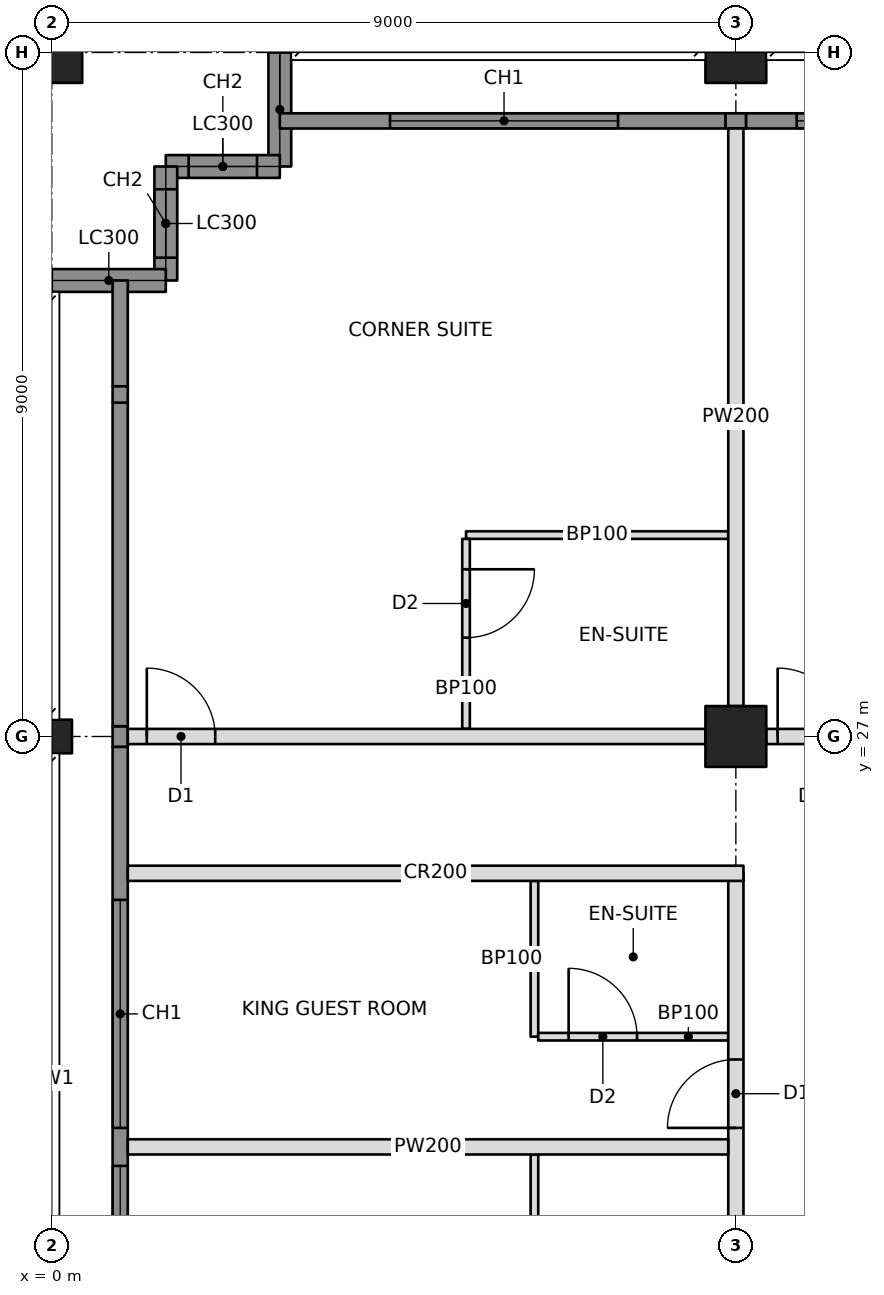
"""IFC4 building model, lengths in metres.
Left out: names, types, materials, properties, quantities, classifications, styles, units other than length and angle.
Written with IfcOpenShell. Run it as: python <this file> out.ifc"""

import sys

from ifc_helpers import new_model, si_unit, direction, frame, frame_2d, origin, origin_2d, place, context, subcontext, project, spatial, rectangle, hollow_rectangle, i_section, extrude, element, fill, save


model = new_model("IFC4")
c1 = context("Model", 3, precision=1e-05, world=origin(), true_north=direction((0.0, 1.0)))
c2 = subcontext(c1, "Body", "Model", "MODEL_VIEW")
j1 = project(units=[si_unit("LENGTHUNIT", "METRE"), si_unit("PLANEANGLEUNIT", "RADIAN")], contexts=[c1])
p1 = place(None, origin())
s1 = spatial("IfcSite", under=j1, at=p1, CompositionType="ELEMENT")
p2 = place(p1, origin())
s2 = spatial("IfcBuilding", under=s1, at=p2, CompositionType="ELEMENT")
p3 = place(p2, frame((0.0, 0.0, 148.6)))
s3 = spatial("IfcBuildingStorey", under=s2, at=p3, CompositionType="ELEMENT", Elevation=148.6)
p4 = place(p3, frame((0.0, 27.0, 0.0), z_axis=(0.0, 0.0, 1.0), x_axis=(0.0, 1.0, 0.0)))
e1 = element("IfcColumn", 1, at=p4, inside=s3, PredefinedType="COLUMN", context=c2, shape_type="SweptSolid", body=[
    extrude(i_section(OverallWidth=0.442, OverallDepth=0.531, WebThickness=0.066, FlangeThickness=0.106, at=origin_2d()), origin(), (0.0, 0.0, 1.0), 3.4),
])
p5 = place(p3, frame((0.0, 36.0, 0.0), z_axis=(0.0, 0.0, 1.0), x_axis=(1.0, 0.0, 0.0)))
e2 = element("IfcColumn", 2, at=p5, inside=s3, PredefinedType="COLUMN", context=c2, shape_type="SweptSolid", body=[
    extrude(hollow_rectangle(XDim=0.8, YDim=0.8, WallThickness=0.06, at=origin_2d()), origin(), (0.0, 0.0, 1.0), 3.4),
])
p6 = place(p3, frame((9.0, 27.0, 0.0), z_axis=(0.0, 0.0, 1.0), x_axis=(1.0, 0.0, 0.0)))
e3 = element("IfcColumn", 3, at=p6, inside=s3, PredefinedType="COLUMN", context=c2, shape_type="SweptSolid", body=[
    extrude(hollow_rectangle(XDim=0.8, YDim=0.8, WallThickness=0.07, at=origin_2d()), origin(), (0.0, 0.0, 1.0), 3.4),
])
p7 = place(p3, frame((9.0, 36.0, 0.0), z_axis=(0.0, 0.0, 1.0), x_axis=(1.0, 0.0, 0.0)))
e4 = element("IfcColumn", 4, at=p7, inside=s3, PredefinedType="COLUMN", context=c2, shape_type="SweptSolid", body=[
    extrude(hollow_rectangle(XDim=0.8, YDim=0.8, WallThickness=0.06, at=origin_2d()), origin(), (0.0, 0.0, 1.0), 3.4),
])
p8 = place(p3, frame((3.0, 36.0, 0.0), z_axis=(0.0, 0.0, 1.0), x_axis=(0.0, -1.0, 0.0)))
e5 = element("IfcWall", 5, at=p8, inside=s3, PredefinedType="SOLIDWALL", context=c2, shape_type="SweptSolid", body=[
    extrude(rectangle(XDim=1.5, YDim=0.3, at=frame_2d((0.75, 0.0))), origin(), (0.0, 0.0, 1.0), 2.42),
])
p9 = place(p3, frame((3.0, 34.5, 0.0), z_axis=(0.0, 0.0, 1.0), x_axis=(-1.0, 0.0, 0.0)))
e6 = element("IfcWall", 6, at=p9, inside=s3, PredefinedType="SOLIDWALL", context=c2, shape_type="SweptSolid", body=[
    extrude(rectangle(XDim=1.5, YDim=0.3, at=frame_2d((0.75, 0.0))), origin(), (0.0, 0.0, 1.0), 3.2),
])
p10 = place(p9, frame((0.3, 0.0, 0.6)))
e7 = element("IfcOpeningElement", 7, at=p10, cuts=e6, PredefinedType="OPENING", context=c2, shape_type="SweptSolid", body=[
    extrude(rectangle(XDim=0.9, YDim=2.2, at=frame_2d((0.45, 1.1))), frame((0.0, 0.16, 0.0), z_axis=(0.0, -1.0, 0.0), x_axis=(1.0, 0.0, 0.0)), (0.0, 0.0, 1.0), 0.32),
])
p11 = place(p3, frame((1.5, 34.5, 0.0), z_axis=(0.0, 0.0, 1.0), x_axis=(0.0, -1.0, 0.0)))
e8 = element("IfcWall", 8, at=p11, inside=s3, PredefinedType="SOLIDWALL", context=c2, shape_type="SweptSolid", body=[
    extrude(rectangle(XDim=1.5, YDim=0.3, at=frame_2d((0.75, 0.0))), origin(), (0.0, 0.0, 1.0), 3.2),
])
p12 = place(p11, frame((0.3, 0.0, 0.6)))
e9 = element("IfcOpeningElement", 9, at=p12, cuts=e8, PredefinedType="OPENING", context=c2, shape_type="SweptSolid", body=[
    extrude(rectangle(XDim=0.9, YDim=2.2, at=frame_2d((0.45, 1.1))), frame((0.0, 0.16, 0.0), z_axis=(0.0, -1.0, 0.0), x_axis=(1.0, 0.0, 0.0)), (0.0, 0.0, 1.0), 0.32),
])
p13 = place(p3, frame((1.5, 33.0, 0.0), z_axis=(0.0, 0.0, 1.0), x_axis=(-1.0, 0.0, 0.0)))
e10 = element("IfcWall", 10, at=p13, inside=s3, PredefinedType="SOLIDWALL", context=c2, shape_type="SweptSolid", body=[
    extrude(rectangle(XDim=1.5, YDim=0.3, at=frame_2d((0.75, 0.0))), origin(), (0.0, 0.0, 1.0), 2.42),
])
p14 = place(p3, frame((3.0, 35.1, 0.0), z_axis=(0.0, 0.0, 1.0), x_axis=(1.0, 0.0, 0.0)))
e11 = element("IfcWall", 11, at=p14, inside=s3, PredefinedType="SOLIDWALL", context=c2, shape_type="SweptSolid", body=[
    extrude(rectangle(XDim=5.865, YDim=0.2, at=frame_2d((2.932, 0.0))), origin(), (0.0, 0.0, 1.0), 3.2),
])
p15 = place(p14, frame((1.45, 0.0, 0.6)))
e12 = element("IfcOpeningElement", 12, at=p15, cuts=e11, PredefinedType="OPENING", context=c2, shape_type="SweptSolid", body=[
    extrude(rectangle(XDim=3.0, YDim=2.2, at=frame_2d((1.5, 1.1))), frame((0.0, 0.11, 0.0), z_axis=(0.0, -1.0, 0.0), x_axis=(1.0, 0.0, 0.0)), (0.0, 0.0, 1.0), 0.22),
])
p16 = place(p3, frame((1.0, 27.0, 0.0), z_axis=(0.0, 0.0, 1.0), x_axis=(1.0, 0.0, 0.0)))
e13 = element("IfcWall", 13, at=p16, inside=s3, PredefinedType="PARTITIONING", context=c2, shape_type="SweptSolid", body=[
    extrude(rectangle(XDim=7.6, YDim=0.2, at=frame_2d((3.8, 0.0))), origin(), (0.0, 0.0, 1.0), 2.438),
])
p17 = place(p16, frame((0.25, 0.0, 0.0)))
e14 = element("IfcOpeningElement", 14, at=p17, cuts=e13, PredefinedType="OPENING", context=c2, shape_type="SweptSolid", body=[
    extrude(rectangle(XDim=0.9, YDim=2.1, at=frame_2d((0.45, 1.05))), frame((0.0, 0.11, 0.0), z_axis=(0.0, -1.0, 0.0), x_axis=(1.0, 0.0, 0.0)), (0.0, 0.0, 1.0), 0.22),
])
p18 = place(p3, frame((9.4, 27.0, 0.0), z_axis=(0.0, 0.0, 1.0), x_axis=(1.0, 0.0, 0.0)))
e15 = element("IfcWall", 15, at=p18, inside=s3, PredefinedType="PARTITIONING", context=c2, shape_type="SweptSolid", body=[
    extrude(rectangle(XDim=8.2, YDim=0.2, at=frame_2d((4.1, 0.0))), origin(), (0.0, 0.0, 1.0), 2.405),
])
p19 = place(p18, frame((0.15, 0.0, 0.0)))
e16 = element("IfcOpeningElement", 16, at=p19, cuts=e15, PredefinedType="OPENING", context=c2, shape_type="SweptSolid", body=[
    extrude(rectangle(XDim=0.9, YDim=2.1, at=frame_2d((0.45, 1.05))), frame((0.0, 0.11, 0.0), z_axis=(0.0, -1.0, 0.0), x_axis=(1.0, 0.0, 0.0)), (0.0, 0.0, 1.0), 0.22),
])
p20 = place(p3, frame((9.0, 18.4, 0.0), z_axis=(0.0, 0.0, 1.0), x_axis=(0.0, 1.0, 0.0)))
e17 = element("IfcWall", 17, at=p20, inside=s3, PredefinedType="PARTITIONING", context=c2, shape_type="SweptSolid", body=[
    extrude(rectangle(XDim=6.8, YDim=0.2, at=frame_2d((3.4, 0.0))), origin(), (0.0, 0.0, 1.0), 2.405),
])
p21 = place(p20, frame((3.45, 0.0, 0.0)))
e18 = element("IfcOpeningElement", 18, at=p21, cuts=e17, PredefinedType="OPENING", context=c2, shape_type="SweptSolid", body=[
    extrude(rectangle(XDim=0.9, YDim=2.1, at=frame_2d((0.45, 1.05))), frame((0.0, 0.11, 0.0), z_axis=(0.0, -1.0, 0.0), x_axis=(1.0, 0.0, 0.0)), (0.0, 0.0, 1.0), 0.22),
])
p22 = place(p3, frame((1.0, 25.2, 0.0), z_axis=(0.0, 0.0, 1.0), x_axis=(1.0, 0.0, 0.0)))
e19 = element("IfcWall", 19, at=p22, inside=s3, PredefinedType="PARTITIONING", context=c2, shape_type="SweptSolid", body=[
    extrude(rectangle(XDim=8.1, YDim=0.2, at=frame_2d((4.05, 0.0))), origin(), (0.0, 0.0, 1.0), 2.404),
])
p23 = place(p3, frame((9.0, 27.4, 0.0), z_axis=(0.0, 0.0, 1.0), x_axis=(0.0, 1.0, 0.0)))
e20 = element("IfcWall", 20, at=p23, inside=s3, PredefinedType="PARTITIONING", context=c2, shape_type="SweptSolid", body=[
    extrude(rectangle(XDim=7.6, YDim=0.2, at=frame_2d((3.8, 0.0))), origin(), (0.0, 0.0, 1.0), 2.438),
])
p24 = place(p3, frame((5.45, 29.65, 0.0), z_axis=(0.0, 0.0, 1.0), x_axis=(1.0, 0.0, 0.0)))
e21 = element("IfcWall", 21, at=p24, inside=s3, PredefinedType="PARTITIONING", context=c2, shape_type="SweptSolid", body=[
    extrude(rectangle(XDim=3.45, YDim=0.1, at=frame_2d((1.725, 0.0))), origin(), (0.0, 0.0, 1.0), 2.438),
])
p25 = place(p3, frame((5.45, 27.1, 0.0), z_axis=(0.0, 0.0, 1.0), x_axis=(0.0, 1.0, 0.0)))
e22 = element("IfcWall", 22, at=p25, inside=s3, PredefinedType="PARTITIONING", context=c2, shape_type="SweptSolid", body=[
    extrude(rectangle(XDim=2.5, YDim=0.1, at=frame_2d((1.25, 0.0))), origin(), (0.0, 0.0, 1.0), 2.438),
])
p26 = place(p25, frame((1.2, 0.0, 0.0)))
e23 = element("IfcOpeningElement", 23, at=p26, cuts=e22, PredefinedType="OPENING", context=c2, shape_type="SweptSolid", body=[
    extrude(rectangle(XDim=0.9, YDim=2.1, at=frame_2d((0.45, 1.05))), frame((0.0, 0.06, 0.0), z_axis=(0.0, -1.0, 0.0), x_axis=(1.0, 0.0, 0.0)), (0.0, 0.0, 1.0), 0.12),
])
p27 = place(p3, frame((8.9, 21.6, 0.0), z_axis=(0.0, 0.0, 1.0), x_axis=(-1.0, 0.0, 0.0)))
e24 = element("IfcWall", 24, at=p27, inside=s3, PredefinedType="PARTITIONING", context=c2, shape_type="SweptSolid", body=[
    extrude(rectangle(XDim=7.9, YDim=0.2, at=frame_2d((3.95, 0.0))), origin(), (0.0, 0.0, 1.0), 2.404),
])
p28 = place(p3, frame((6.35, 18.05, 0.0), z_axis=(0.0, 0.0, 1.0), x_axis=(0.0, 1.0, 0.0)))
e25 = element("IfcWall", 25, at=p28, inside=s3, PredefinedType="PARTITIONING", context=c2, shape_type="SweptSolid", body=[
    extrude(rectangle(XDim=3.45, YDim=0.1, at=frame_2d((1.725, 0.0))), origin(), (0.0, 0.0, 1.0), 2.404),
])
p29 = place(p3, frame((6.35, 23.05, 0.0), z_axis=(0.0, 0.0, 1.0), x_axis=(0.0, 1.0, 0.0)))
e26 = element("IfcWall", 26, at=p29, inside=s3, PredefinedType="PARTITIONING", context=c2, shape_type="SweptSolid", body=[
    extrude(rectangle(XDim=2.05, YDim=0.1, at=frame_2d((1.025, 0.0))), origin(), (0.0, 0.0, 1.0), 3.2),
])
p30 = place(p3, frame((8.9, 23.05, 0.0), z_axis=(0.0, 0.0, 1.0), x_axis=(-1.0, 0.0, 0.0)))
e27 = element("IfcWall", 27, at=p30, inside=s3, PredefinedType="PARTITIONING", context=c2, shape_type="SweptSolid", body=[
    extrude(rectangle(XDim=2.5, YDim=0.1, at=frame_2d((1.25, 0.0))), origin(), (0.0, 0.0, 1.0), 2.404),
])
p31 = place(p30, frame((1.2, 0.0, 0.0)))
e28 = element("IfcOpeningElement", 28, at=p31, cuts=e27, PredefinedType="OPENING", context=c2, shape_type="SweptSolid", body=[
    extrude(rectangle(XDim=0.9, YDim=2.1, at=frame_2d((0.45, 1.05))), frame((0.0, 0.06, 0.0), z_axis=(0.0, -1.0, 0.0), x_axis=(1.0, 0.0, 0.0)), (0.0, 0.0, 1.0), 0.12),
])
p32 = place(p3, frame((0.9, 18.194, 0.0), z_axis=(0.0, 0.0, 1.0), x_axis=(0.0, 1.0, 0.0)))
e29 = element("IfcWall", 29, at=p32, inside=s3, PredefinedType="SOLIDWALL", context=c2, shape_type="SweptSolid", body=[
    extrude(rectangle(XDim=8.671, YDim=0.2, at=frame_2d((4.335, 0.0))), origin(), (0.0, 0.0, 1.0), 3.2),
])
p33 = place(p32, frame((0.156, 0.0, 0.6)))
e30 = element("IfcOpeningElement", 30, at=p33, cuts=e29, PredefinedType="OPENING", context=c2, shape_type="SweptSolid", body=[
    extrude(rectangle(XDim=3.0, YDim=2.2, at=frame_2d((1.5, 1.1))), frame((0.0, 0.11, 0.0), z_axis=(0.0, -1.0, 0.0), x_axis=(1.0, 0.0, 0.0)), (0.0, 0.0, 1.0), 0.22),
])
p34 = place(p32, frame((3.656, 0.0, 0.6)))
e31 = element("IfcOpeningElement", 31, at=p34, cuts=e29, PredefinedType="OPENING", context=c2, shape_type="SweptSolid", body=[
    extrude(rectangle(XDim=3.0, YDim=2.2, at=frame_2d((1.5, 1.1))), frame((0.0, 0.11, 0.0), z_axis=(0.0, -1.0, 0.0), x_axis=(1.0, 0.0, 0.0)), (0.0, 0.0, 1.0), 0.22),
])
p35 = place(p3, frame((0.9, 26.865, 0.0), z_axis=(0.0, 0.0, 1.0), x_axis=(0.0, 1.0, 0.0)))
e32 = element("IfcWall", 32, at=p35, inside=s3, PredefinedType="SOLIDWALL", context=c2, shape_type="SweptSolid", body=[
    extrude(rectangle(XDim=0.271, YDim=0.2, at=frame_2d((0.135, 0.0))), origin(), (0.0, 0.0, 1.0), 2.438),
])
p36 = place(p3, frame((0.9, 27.135, 0.0), z_axis=(0.0, 0.0, 1.0), x_axis=(0.0, 1.0, 0.0)))
e33 = element("IfcWall", 33, at=p36, inside=s3, PredefinedType="SOLIDWALL", context=c2, shape_type="SweptSolid", body=[
    extrude(rectangle(XDim=4.257, YDim=0.2, at=frame_2d((2.129, 0.0))), origin(), (0.0, 0.0, 1.0), 3.2),
])
p37 = place(p3, frame((0.9, 31.393, 0.0), z_axis=(0.0, 0.0, 1.0), x_axis=(0.0, 1.0, 0.0)))
e34 = element("IfcWall", 34, at=p37, inside=s3, PredefinedType="SOLIDWALL", context=c2, shape_type="SweptSolid", body=[
    extrude(rectangle(XDim=0.215, YDim=0.2, at=frame_2d((0.107, 0.0))), origin(), (0.0, 0.0, 1.0), 2.661),
])
p38 = place(p3, frame((0.9, 31.607, 0.0), z_axis=(0.0, 0.0, 1.0), x_axis=(0.0, 1.0, 0.0)))
e35 = element("IfcWall", 35, at=p38, inside=s3, PredefinedType="SOLIDWALL", context=c2, shape_type="SweptSolid", body=[
    extrude(rectangle(XDim=1.393, YDim=0.2, at=frame_2d((0.696, 0.0))), origin(), (0.0, 0.0, 1.0), 3.2),
])
p39 = place(p3, frame((8.865, 35.1, 0.0), z_axis=(0.0, 0.0, 1.0), x_axis=(1.0, 0.0, 0.0)))
e36 = element("IfcWall", 36, at=p39, inside=s3, PredefinedType="SOLIDWALL", context=c2, shape_type="SweptSolid", body=[
    extrude(rectangle(XDim=0.271, YDim=0.2, at=frame_2d((0.135, 0.0))), origin(), (0.0, 0.0, 1.0), 2.438),
])
p40 = place(p3, frame((9.135, 35.1, 0.0), z_axis=(0.0, 0.0, 1.0), x_axis=(1.0, 0.0, 0.0)))
e37 = element("IfcWall", 37, at=p40, inside=s3, PredefinedType="SOLIDWALL", context=c2, shape_type="SweptSolid", body=[
    extrude(rectangle(XDim=8.671, YDim=0.2, at=frame_2d((4.335, 0.0))), origin(), (0.0, 0.0, 1.0), 3.2),
])
p41 = place(p40, frame((0.665, 0.0, 0.6)))
e38 = element("IfcOpeningElement", 38, at=p41, cuts=e37, PredefinedType="OPENING", context=c2, shape_type="SweptSolid", body=[
    extrude(rectangle(XDim=3.0, YDim=2.2, at=frame_2d((1.5, 1.1))), frame((0.0, 0.11, 0.0), z_axis=(0.0, -1.0, 0.0), x_axis=(1.0, 0.0, 0.0)), (0.0, 0.0, 1.0), 0.22),
])
p42 = place(p40, frame((5.065, 0.0, 0.6)))
e39 = element("IfcOpeningElement", 39, at=p42, cuts=e37, PredefinedType="OPENING", context=c2, shape_type="SweptSolid", body=[
    extrude(rectangle(XDim=3.0, YDim=2.2, at=frame_2d((1.5, 1.1))), frame((0.0, 0.11, 0.0), z_axis=(0.0, -1.0, 0.0), x_axis=(1.0, 0.0, 0.0)), (0.0, 0.0, 1.0), 0.22),
])
p43 = place(p10, origin())
e40 = element("IfcWindow", 40, at=p43, inside=s3, PartitioningType="SINGLE_PANEL", PredefinedType="WINDOW", context=c2, shape_type="SweptSolid", body=[
    extrude(rectangle(XDim=0.9, YDim=2.2, at=frame_2d((0.45, 1.1))), frame((0.0, 0.03, 0.0), z_axis=(0.0, -1.0, 0.0), x_axis=(1.0, 0.0, 0.0)), (0.0, 0.0, 1.0), 0.06),
])
fill(e7, e40)
p44 = place(p12, origin())
e41 = element("IfcWindow", 41, at=p44, inside=s3, PartitioningType="SINGLE_PANEL", PredefinedType="WINDOW", context=c2, shape_type="SweptSolid", body=[
    extrude(rectangle(XDim=0.9, YDim=2.2, at=frame_2d((0.45, 1.1))), frame((0.0, 0.03, 0.0), z_axis=(0.0, -1.0, 0.0), x_axis=(1.0, 0.0, 0.0)), (0.0, 0.0, 1.0), 0.06),
])
fill(e9, e41)
p45 = place(p15, origin())
e42 = element("IfcWindow", 42, at=p45, inside=s3, PartitioningType="TRIPLE_PANEL_VERTICAL", PredefinedType="WINDOW", context=c2, shape_type="SweptSolid", body=[
    extrude(rectangle(XDim=3.0, YDim=2.2, at=frame_2d((1.5, 1.1))), frame((0.0, 0.03, 0.0), z_axis=(0.0, -1.0, 0.0), x_axis=(1.0, 0.0, 0.0)), (0.0, 0.0, 1.0), 0.06),
])
fill(e12, e42)
p46 = place(p41, origin())
e43 = element("IfcWindow", 43, at=p46, inside=s3, PartitioningType="TRIPLE_PANEL_VERTICAL", PredefinedType="WINDOW", context=c2, shape_type="SweptSolid", body=[
    extrude(rectangle(XDim=3.0, YDim=2.2, at=frame_2d((1.5, 1.1))), frame((0.0, 0.03, 0.0), z_axis=(0.0, -1.0, 0.0), x_axis=(1.0, 0.0, 0.0)), (0.0, 0.0, 1.0), 0.06),
])
fill(e38, e43)
p47 = place(p33, origin())
e44 = element("IfcWindow", 44, at=p47, inside=s3, PartitioningType="TRIPLE_PANEL_VERTICAL", PredefinedType="WINDOW", context=c2, shape_type="SweptSolid", body=[
    extrude(rectangle(XDim=3.0, YDim=2.2, at=frame_2d((1.5, 1.1))), frame((0.0, 0.03, 0.0), z_axis=(0.0, -1.0, 0.0), x_axis=(1.0, 0.0, 0.0)), (0.0, 0.0, 1.0), 0.06),
])
fill(e30, e44)
p48 = place(p34, origin())
e45 = element("IfcWindow", 45, at=p48, inside=s3, PartitioningType="TRIPLE_PANEL_VERTICAL", PredefinedType="WINDOW", context=c2, shape_type="SweptSolid", body=[
    extrude(rectangle(XDim=3.0, YDim=2.2, at=frame_2d((1.5, 1.1))), frame((0.0, 0.03, 0.0), z_axis=(0.0, -1.0, 0.0), x_axis=(1.0, 0.0, 0.0)), (0.0, 0.0, 1.0), 0.06),
])
fill(e31, e45)
p49 = place(p26, frame((0.9, 0.0, 0.0), z_axis=(0.0, 0.0, 1.0), x_axis=(-1.0, 0.0, 0.0)))
e46 = element("IfcDoor", 46, at=p49, inside=s3, OperationType="SINGLE_SWING_LEFT", PredefinedType="DOOR", context=c2, shape_type="SweptSolid", body=[
    extrude(rectangle(XDim=0.9, YDim=2.1, at=frame_2d((0.45, 1.05))), frame((0.0, 0.025, 0.0), z_axis=(0.0, -1.0, 0.0), x_axis=(1.0, 0.0, 0.0)), (0.0, 0.0, 1.0), 0.05),
])
fill(e23, e46)
p50 = place(p17, origin())
e47 = element("IfcDoor", 47, at=p50, inside=s3, OperationType="SINGLE_SWING_LEFT", PredefinedType="DOOR", context=c2, shape_type="SweptSolid", body=[
    extrude(rectangle(XDim=0.9, YDim=2.1, at=frame_2d((0.45, 1.05))), frame((0.0, 0.025, 0.0), z_axis=(0.0, -1.0, 0.0), x_axis=(1.0, 0.0, 0.0)), (0.0, 0.0, 1.0), 0.05),
])
fill(e14, e47)
p51 = place(p19, origin())
e48 = element("IfcDoor", 48, at=p51, inside=s3, OperationType="SINGLE_SWING_LEFT", PredefinedType="DOOR", context=c2, shape_type="SweptSolid", body=[
    extrude(rectangle(XDim=0.9, YDim=2.1, at=frame_2d((0.45, 1.05))), frame((0.0, 0.025, 0.0), z_axis=(0.0, -1.0, 0.0), x_axis=(1.0, 0.0, 0.0)), (0.0, 0.0, 1.0), 0.05),
])
fill(e16, e48)
p52 = place(p31, frame((0.9, 0.0, 0.0), z_axis=(0.0, 0.0, 1.0), x_axis=(-1.0, 0.0, 0.0)))
e49 = element("IfcDoor", 49, at=p52, inside=s3, OperationType="SINGLE_SWING_LEFT", PredefinedType="DOOR", context=c2, shape_type="SweptSolid", body=[
    extrude(rectangle(XDim=0.9, YDim=2.1, at=frame_2d((0.45, 1.05))), frame((0.0, 0.025, 0.0), z_axis=(0.0, -1.0, 0.0), x_axis=(1.0, 0.0, 0.0)), (0.0, 0.0, 1.0), 0.05),
])
fill(e28, e49)
p53 = place(p21, origin())
e50 = element("IfcDoor", 50, at=p53, inside=s3, OperationType="SINGLE_SWING_LEFT", PredefinedType="DOOR", context=c2, shape_type="SweptSolid", body=[
    extrude(rectangle(XDim=0.9, YDim=2.1, at=frame_2d((0.45, 1.05))), frame((0.0, 0.025, 0.0), z_axis=(0.0, -1.0, 0.0), x_axis=(1.0, 0.0, 0.0)), (0.0, 0.0, 1.0), 0.05),
])
fill(e18, e50)
save(model, sys.argv[1])
